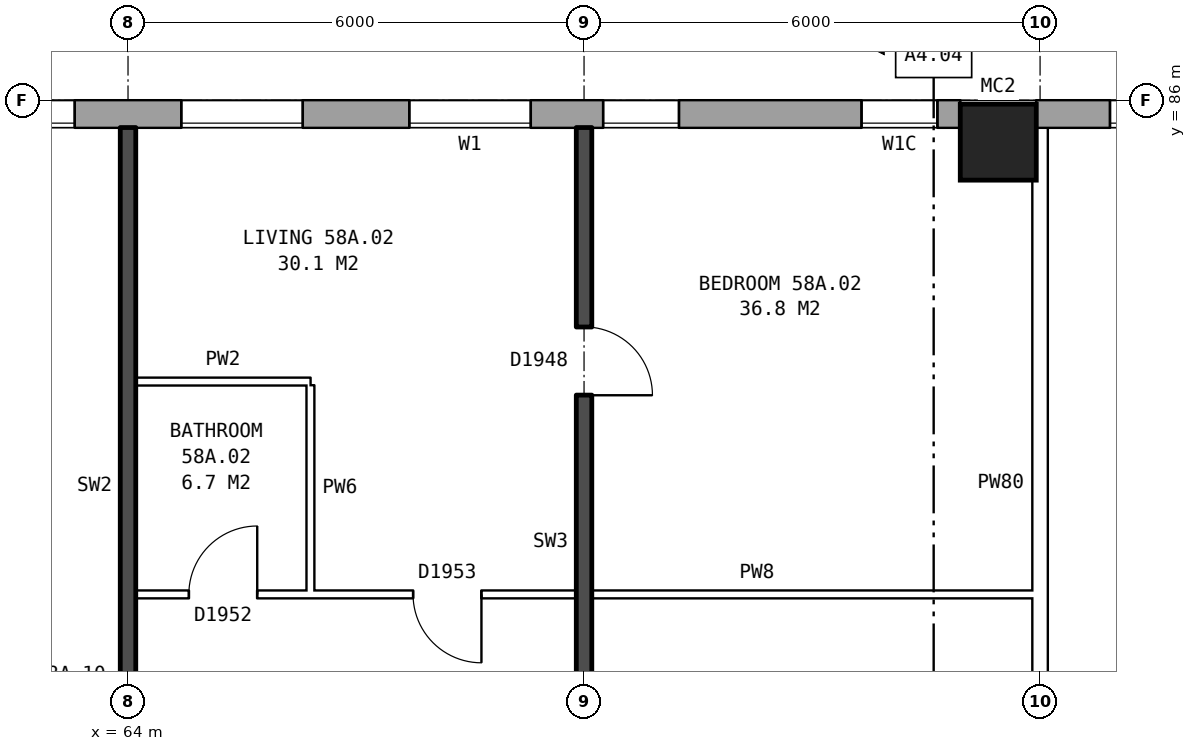
"""IFC4 building model, lengths in metres.
Left out: names, types, materials, properties, quantities, classifications, styles, units other than length and angle.
Written with IfcOpenShell. Run it as: python <this file> out.ifc"""

import sys

from ifc_helpers import new_model, si_unit, direction, frame, frame_2d, origin, origin_2d, place, context, subcontext, project, spatial, rectangle, hollow_rectangle, extrude, element, fill, save


model = new_model("IFC4")
c1 = context("Model", 3, precision=1e-05, world=origin(), true_north=direction((0.0, 1.0)))
c2 = subcontext(c1, "Body", "Model", "MODEL_VIEW")
j1 = project(units=[si_unit("LENGTHUNIT", "METRE"), si_unit("PLANEANGLEUNIT", "RADIAN")], contexts=[c1])
p1 = place(None, origin())
s1 = spatial("IfcSite", under=j1, at=p1, CompositionType="ELEMENT")
p2 = place(p1, origin())
s2 = spatial("IfcBuilding", under=s1, at=p2, CompositionType="ELEMENT")
p3 = place(p2, frame((0.0, 0.0, 205.9)))
s3 = spatial("IfcBuildingStorey", under=s2, at=p3, CompositionType="ELEMENT", Elevation=205.9)
p4 = place(p3, frame((75.45, 85.45, 0.0), z_axis=(0.0, 0.0, 1.0), x_axis=(1.0, 0.0, 0.0)))
e1 = element("IfcColumn", 1, at=p4, inside=s3, PredefinedType="COLUMN", context=c2, shape_type="SweptSolid", body=[
    extrude(hollow_rectangle(XDim=1.0, YDim=1.0, WallThickness=0.055, at=origin_2d()), origin(), (0.0, 0.0, 1.0), 3.1),
])
p5 = place(p3, frame((131.05, 85.82, 0.0), z_axis=(0.0, 0.0, 1.0), x_axis=(-1.0, 0.0, 0.0)))
e2 = element("IfcWall", 2, at=p5, inside=s3, PredefinedType="STANDARD", context=c2, shape_type="SweptSolid", body=[
    extrude(rectangle(XDim=55.1, YDim=0.36, at=frame_2d((27.55, 0.0))), origin(), (0.0, 0.0, 1.0), 2.85),
])
p6 = place(p5, frame((0.969, 0.0, 0.8)))
e3 = element("IfcOpeningElement", 3, at=p6, cuts=e2, PredefinedType="OPENING", context=c2, shape_type="SweptSolid", body=[
    extrude(rectangle(XDim=1.6, YDim=1.8, at=frame_2d((0.8, 0.9))), frame((0.0, 0.19, 0.0), z_axis=(0.0, -1.0, 0.0), x_axis=(1.0, 0.0, 0.0)), (0.0, 0.0, 1.0), 0.38),
])
p7 = place(p5, frame((4.406, 0.0, 0.8)))
e4 = element("IfcOpeningElement", 4, at=p7, cuts=e2, PredefinedType="OPENING", context=c2, shape_type="SweptSolid", body=[
    extrude(rectangle(XDim=1.6, YDim=1.8, at=frame_2d((0.8, 0.9))), frame((0.0, 0.19, 0.0), z_axis=(0.0, -1.0, 0.0), x_axis=(1.0, 0.0, 0.0)), (0.0, 0.0, 1.0), 0.38),
])
p8 = place(p5, frame((7.844, 0.0, 0.8)))
e5 = element("IfcOpeningElement", 5, at=p8, cuts=e2, PredefinedType="OPENING", context=c2, shape_type="SweptSolid", body=[
    extrude(rectangle(XDim=1.6, YDim=1.8, at=frame_2d((0.8, 0.9))), frame((0.0, 0.19, 0.0), z_axis=(0.0, -1.0, 0.0), x_axis=(1.0, 0.0, 0.0)), (0.0, 0.0, 1.0), 0.38),
])
p9 = place(p5, frame((11.281, 0.0, 0.8)))
e6 = element("IfcOpeningElement", 6, at=p9, cuts=e2, PredefinedType="OPENING", context=c2, shape_type="SweptSolid", body=[
    extrude(rectangle(XDim=1.6, YDim=1.8, at=frame_2d((0.8, 0.9))), frame((0.0, 0.19, 0.0), z_axis=(0.0, -1.0, 0.0), x_axis=(1.0, 0.0, 0.0)), (0.0, 0.0, 1.0), 0.38),
])
p10 = place(p5, frame((14.719, 0.0, 0.8)))
e7 = element("IfcOpeningElement", 7, at=p10, cuts=e2, PredefinedType="OPENING", context=c2, shape_type="SweptSolid", body=[
    extrude(rectangle(XDim=1.6, YDim=1.8, at=frame_2d((0.8, 0.9))), frame((0.0, 0.19, 0.0), z_axis=(0.0, -1.0, 0.0), x_axis=(1.0, 0.0, 0.0)), (0.0, 0.0, 1.0), 0.38),
])
p11 = place(p5, frame((18.156, 0.0, 0.8)))
e8 = element("IfcOpeningElement", 8, at=p11, cuts=e2, PredefinedType="OPENING", context=c2, shape_type="SweptSolid", body=[
    extrude(rectangle(XDim=1.6, YDim=1.8, at=frame_2d((0.8, 0.9))), frame((0.0, 0.19, 0.0), z_axis=(0.0, -1.0, 0.0), x_axis=(1.0, 0.0, 0.0)), (0.0, 0.0, 1.0), 0.38),
])
p12 = place(p5, frame((21.594, 0.0, 0.8)))
e9 = element("IfcOpeningElement", 9, at=p12, cuts=e2, PredefinedType="OPENING", context=c2, shape_type="SweptSolid", body=[
    extrude(rectangle(XDim=1.6, YDim=1.8, at=frame_2d((0.8, 0.9))), frame((0.0, 0.19, 0.0), z_axis=(0.0, -1.0, 0.0), x_axis=(1.0, 0.0, 0.0)), (0.0, 0.0, 1.0), 0.38),
])
p13 = place(p5, frame((25.031, 0.0, 0.8)))
e10 = element("IfcOpeningElement", 10, at=p13, cuts=e2, PredefinedType="OPENING", context=c2, shape_type="SweptSolid", body=[
    extrude(rectangle(XDim=1.6, YDim=1.8, at=frame_2d((0.8, 0.9))), frame((0.0, 0.19, 0.0), z_axis=(0.0, -1.0, 0.0), x_axis=(1.0, 0.0, 0.0)), (0.0, 0.0, 1.0), 0.38),
])
p14 = place(p5, frame((28.469, 0.0, 0.8)))
e11 = element("IfcOpeningElement", 11, at=p14, cuts=e2, PredefinedType="OPENING", context=c2, shape_type="SweptSolid", body=[
    extrude(rectangle(XDim=1.6, YDim=1.8, at=frame_2d((0.8, 0.9))), frame((0.0, 0.19, 0.0), z_axis=(0.0, -1.0, 0.0), x_axis=(1.0, 0.0, 0.0)), (0.0, 0.0, 1.0), 0.38),
])
p15 = place(p5, frame((31.906, 0.0, 0.8)))
e12 = element("IfcOpeningElement", 12, at=p15, cuts=e2, PredefinedType="OPENING", context=c2, shape_type="SweptSolid", body=[
    extrude(rectangle(XDim=1.6, YDim=1.8, at=frame_2d((0.8, 0.9))), frame((0.0, 0.19, 0.0), z_axis=(0.0, -1.0, 0.0), x_axis=(1.0, 0.0, 0.0)), (0.0, 0.0, 1.0), 0.38),
])
p16 = place(p5, frame((35.344, 0.0, 0.8)))
e13 = element("IfcOpeningElement", 13, at=p16, cuts=e2, PredefinedType="OPENING", context=c2, shape_type="SweptSolid", body=[
    extrude(rectangle(XDim=1.6, YDim=1.8, at=frame_2d((0.8, 0.9))), frame((0.0, 0.19, 0.0), z_axis=(0.0, -1.0, 0.0), x_axis=(1.0, 0.0, 0.0)), (0.0, 0.0, 1.0), 0.38),
])
p17 = place(p5, frame((38.781, 0.0, 0.8)))
e14 = element("IfcOpeningElement", 14, at=p17, cuts=e2, PredefinedType="OPENING", context=c2, shape_type="SweptSolid", body=[
    extrude(rectangle(XDim=1.6, YDim=1.8, at=frame_2d((0.8, 0.9))), frame((0.0, 0.19, 0.0), z_axis=(0.0, -1.0, 0.0), x_axis=(1.0, 0.0, 0.0)), (0.0, 0.0, 1.0), 0.38),
])
p18 = place(p5, frame((42.219, 0.0, 0.8)))
e15 = element("IfcOpeningElement", 15, at=p18, cuts=e2, PredefinedType="OPENING", context=c2, shape_type="SweptSolid", body=[
    extrude(rectangle(XDim=1.6, YDim=1.8, at=frame_2d((0.8, 0.9))), frame((0.0, 0.19, 0.0), z_axis=(0.0, -1.0, 0.0), x_axis=(1.0, 0.0, 0.0)), (0.0, 0.0, 1.0), 0.38),
])
p19 = place(p5, frame((45.656, 0.0, 0.8)))
e16 = element("IfcOpeningElement", 16, at=p19, cuts=e2, PredefinedType="OPENING", context=c2, shape_type="SweptSolid", body=[
    extrude(rectangle(XDim=1.6, YDim=1.8, at=frame_2d((0.8, 0.9))), frame((0.0, 0.19, 0.0), z_axis=(0.0, -1.0, 0.0), x_axis=(1.0, 0.0, 0.0)), (0.0, 0.0, 1.0), 0.38),
])
p20 = place(p5, frame((49.094, 0.0, 0.8)))
e17 = element("IfcOpeningElement", 17, at=p20, cuts=e2, PredefinedType="OPENING", context=c2, shape_type="SweptSolid", body=[
    extrude(rectangle(XDim=1.6, YDim=1.8, at=frame_2d((0.8, 0.9))), frame((0.0, 0.19, 0.0), z_axis=(0.0, -1.0, 0.0), x_axis=(1.0, 0.0, 0.0)), (0.0, 0.0, 1.0), 0.38),
])
p21 = place(p5, frame((52.531, 0.0, 0.8)))
e18 = element("IfcOpeningElement", 18, at=p21, cuts=e2, PredefinedType="OPENING", context=c2, shape_type="SweptSolid", body=[
    extrude(rectangle(XDim=1.6, YDim=1.8, at=frame_2d((0.8, 0.9))), frame((0.0, 0.19, 0.0), z_axis=(0.0, -1.0, 0.0), x_axis=(1.0, 0.0, 0.0)), (0.0, 0.0, 1.0), 0.38),
])
p22 = place(p3, frame((74.95, 85.82, 0.0), z_axis=(0.0, 0.0, 1.0), x_axis=(-1.0, 0.0, 0.0)))
e19 = element("IfcWall", 19, at=p22, inside=s3, PredefinedType="STANDARD", context=c2, shape_type="SweptSolid", body=[
    extrude(rectangle(XDim=39.875, YDim=0.36, at=frame_2d((19.938, 0.0))), origin(), (0.0, 0.0, 1.0), 2.85),
])
p23 = place(p22, frame((0.3, 0.0, 0.8)))
e20 = element("IfcOpeningElement", 20, at=p23, cuts=e19, PredefinedType="OPENING", context=c2, shape_type="SweptSolid", body=[
    extrude(rectangle(XDim=1.0, YDim=1.8, at=frame_2d((0.5, 0.9))), frame((0.0, 0.19, 0.0), z_axis=(0.0, -1.0, 0.0), x_axis=(1.0, 0.0, 0.0)), (0.0, 0.0, 1.0), 0.38),
])
p24 = place(p22, frame((5.65, 0.0, 0.8)))
e21 = element("IfcOpeningElement", 21, at=p24, cuts=e19, PredefinedType="OPENING", context=c2, shape_type="SweptSolid", body=[
    extrude(rectangle(XDim=1.6, YDim=1.8, at=frame_2d((0.8, 0.9))), frame((0.0, 0.19, 0.0), z_axis=(0.0, -1.0, 0.0), x_axis=(1.0, 0.0, 0.0)), (0.0, 0.0, 1.0), 0.38),
])
p25 = place(p22, frame((8.65, 0.0, 0.8)))
e22 = element("IfcOpeningElement", 22, at=p25, cuts=e19, PredefinedType="OPENING", context=c2, shape_type="SweptSolid", body=[
    extrude(rectangle(XDim=1.6, YDim=1.8, at=frame_2d((0.8, 0.9))), frame((0.0, 0.19, 0.0), z_axis=(0.0, -1.0, 0.0), x_axis=(1.0, 0.0, 0.0)), (0.0, 0.0, 1.0), 0.38),
])
p26 = place(p22, frame((11.65, 0.0, 0.8)))
e23 = element("IfcOpeningElement", 23, at=p26, cuts=e19, PredefinedType="OPENING", context=c2, shape_type="SweptSolid", body=[
    extrude(rectangle(XDim=1.6, YDim=1.8, at=frame_2d((0.8, 0.9))), frame((0.0, 0.19, 0.0), z_axis=(0.0, -1.0, 0.0), x_axis=(1.0, 0.0, 0.0)), (0.0, 0.0, 1.0), 0.38),
])
p27 = place(p22, frame((14.65, 0.0, 0.8)))
e24 = element("IfcOpeningElement", 24, at=p27, cuts=e19, PredefinedType="OPENING", context=c2, shape_type="SweptSolid", body=[
    extrude(rectangle(XDim=1.6, YDim=1.8, at=frame_2d((0.8, 0.9))), frame((0.0, 0.19, 0.0), z_axis=(0.0, -1.0, 0.0), x_axis=(1.0, 0.0, 0.0)), (0.0, 0.0, 1.0), 0.38),
])
p28 = place(p22, frame((17.65, 0.0, 0.8)))
e25 = element("IfcOpeningElement", 25, at=p28, cuts=e19, PredefinedType="OPENING", context=c2, shape_type="SweptSolid", body=[
    extrude(rectangle(XDim=1.6, YDim=1.8, at=frame_2d((0.8, 0.9))), frame((0.0, 0.19, 0.0), z_axis=(0.0, -1.0, 0.0), x_axis=(1.0, 0.0, 0.0)), (0.0, 0.0, 1.0), 0.38),
])
p29 = place(p22, frame((20.65, 0.0, 0.8)))
e26 = element("IfcOpeningElement", 26, at=p29, cuts=e19, PredefinedType="OPENING", context=c2, shape_type="SweptSolid", body=[
    extrude(rectangle(XDim=1.6, YDim=1.8, at=frame_2d((0.8, 0.9))), frame((0.0, 0.19, 0.0), z_axis=(0.0, -1.0, 0.0), x_axis=(1.0, 0.0, 0.0)), (0.0, 0.0, 1.0), 0.38),
])
p30 = place(p22, frame((23.65, 0.0, 0.8)))
e27 = element("IfcOpeningElement", 27, at=p30, cuts=e19, PredefinedType="OPENING", context=c2, shape_type="SweptSolid", body=[
    extrude(rectangle(XDim=1.6, YDim=1.8, at=frame_2d((0.8, 0.9))), frame((0.0, 0.19, 0.0), z_axis=(0.0, -1.0, 0.0), x_axis=(1.0, 0.0, 0.0)), (0.0, 0.0, 1.0), 0.38),
])
p31 = place(p22, frame((26.65, 0.0, 0.8)))
e28 = element("IfcOpeningElement", 28, at=p31, cuts=e19, PredefinedType="OPENING", context=c2, shape_type="SweptSolid", body=[
    extrude(rectangle(XDim=1.6, YDim=1.8, at=frame_2d((0.8, 0.9))), frame((0.0, 0.19, 0.0), z_axis=(0.0, -1.0, 0.0), x_axis=(1.0, 0.0, 0.0)), (0.0, 0.0, 1.0), 0.38),
])
p32 = place(p22, frame((29.65, 0.0, 0.8)))
e29 = element("IfcOpeningElement", 29, at=p32, cuts=e19, PredefinedType="OPENING", context=c2, shape_type="SweptSolid", body=[
    extrude(rectangle(XDim=1.6, YDim=1.8, at=frame_2d((0.8, 0.9))), frame((0.0, 0.19, 0.0), z_axis=(0.0, -1.0, 0.0), x_axis=(1.0, 0.0, 0.0)), (0.0, 0.0, 1.0), 0.38),
])
p33 = place(p22, frame((32.65, 0.0, 0.8)))
e30 = element("IfcOpeningElement", 30, at=p33, cuts=e19, PredefinedType="OPENING", context=c2, shape_type="SweptSolid", body=[
    extrude(rectangle(XDim=1.6, YDim=1.8, at=frame_2d((0.8, 0.9))), frame((0.0, 0.19, 0.0), z_axis=(0.0, -1.0, 0.0), x_axis=(1.0, 0.0, 0.0)), (0.0, 0.0, 1.0), 0.38),
])
p34 = place(p22, frame((35.65, 0.0, 0.8)))
e31 = element("IfcOpeningElement", 31, at=p34, cuts=e19, PredefinedType="OPENING", context=c2, shape_type="SweptSolid", body=[
    extrude(rectangle(XDim=1.6, YDim=1.8, at=frame_2d((0.8, 0.9))), frame((0.0, 0.19, 0.0), z_axis=(0.0, -1.0, 0.0), x_axis=(1.0, 0.0, 0.0)), (0.0, 0.0, 1.0), 0.38),
])
p35 = place(p22, frame((3.7, 0.0, 0.8)))
e32 = element("IfcOpeningElement", 32, at=p35, cuts=e19, PredefinedType="OPENING", context=c2, shape_type="SweptSolid", body=[
    extrude(rectangle(XDim=1.0, YDim=1.8, at=frame_2d((0.5, 0.9))), frame((0.0, 0.19, 0.0), z_axis=(0.0, -1.0, 0.0), x_axis=(1.0, 0.0, 0.0)), (0.0, 0.0, 1.0), 0.38),
])
p36 = place(p3, frame((64.1, 79.5, 0.0), z_axis=(0.0, 0.0, 1.0), x_axis=(1.0, 0.0, 0.0)))
e33 = element("IfcWall", 33, at=p36, inside=s3, PredefinedType="PARTITIONING", context=c2, shape_type="SweptSolid", body=[
    extrude(rectangle(XDim=11.8, YDim=0.1, at=frame_2d((5.9, 0.0))), origin(), (0.0, 0.0, 1.0), 2.85),
])
p37 = place(p36, frame((3.65, 0.0, 0.0)))
e34 = element("IfcOpeningElement", 34, at=p37, cuts=e33, PredefinedType="OPENING", context=c2, shape_type="SweptSolid", body=[
    extrude(rectangle(XDim=0.9, YDim=2.1, at=frame_2d((0.45, 1.05))), frame((0.0, 0.06, 0.0), z_axis=(0.0, -1.0, 0.0), x_axis=(1.0, 0.0, 0.0)), (0.0, 0.0, 1.0), 0.12),
])
p38 = place(p36, frame((0.7, 0.0, 0.0)))
e35 = element("IfcOpeningElement", 35, at=p38, cuts=e33, PredefinedType="OPENING", context=c2, shape_type="SweptSolid", body=[
    extrude(rectangle(XDim=0.9, YDim=2.1, at=frame_2d((0.45, 1.05))), frame((0.0, 0.06, 0.0), z_axis=(0.0, -1.0, 0.0), x_axis=(1.0, 0.0, 0.0)), (0.0, 0.0, 1.0), 0.12),
])
p39 = place(p3, frame((64.1, 82.3, 0.0), z_axis=(0.0, 0.0, 1.0), x_axis=(1.0, 0.0, 0.0)))
e36 = element("IfcWall", 36, at=p39, inside=s3, PredefinedType="PARTITIONING", context=c2, shape_type="SweptSolid", body=[
    extrude(rectangle(XDim=2.3, YDim=0.1, at=frame_2d((1.15, 0.0))), origin(), (0.0, 0.0, 1.0), 2.85),
])
p40 = place(p3, frame((64.0, 76.2, 0.0), z_axis=(0.0, 0.0, 1.0), x_axis=(0.0, 1.0, 0.0)))
e37 = element("IfcWall", 37, at=p40, inside=s3, PredefinedType="SOLIDWALL", context=c2, shape_type="SweptSolid", body=[
    extrude(rectangle(XDim=9.44, YDim=0.2, at=frame_2d((4.72, 0.0))), origin(), (0.0, 0.0, 1.0), 2.85),
])
p41 = place(p3, frame((66.4, 79.55, 0.0), z_axis=(0.0, 0.0, 1.0), x_axis=(0.0, 1.0, 0.0)))
e38 = element("IfcWall", 38, at=p41, inside=s3, PredefinedType="PARTITIONING", context=c2, shape_type="SweptSolid", body=[
    extrude(rectangle(XDim=2.7, YDim=0.1, at=frame_2d((1.35, 0.0))), origin(), (0.0, 0.0, 1.0), 2.85),
])
p42 = place(p3, frame((70.0, 76.2, 0.0), z_axis=(0.0, 0.0, 1.0), x_axis=(0.0, 1.0, 0.0)))
e39 = element("IfcWall", 39, at=p42, inside=s3, PredefinedType="SOLIDWALL", context=c2, shape_type="SweptSolid", body=[
    extrude(rectangle(XDim=9.44, YDim=0.2, at=frame_2d((4.72, 0.0))), origin(), (0.0, 0.0, 1.0), 2.85),
])
p43 = place(p42, frame((5.92, 0.0, 0.0)))
e40 = element("IfcOpeningElement", 40, at=p43, cuts=e39, PredefinedType="OPENING", context=c2, shape_type="SweptSolid", body=[
    extrude(rectangle(XDim=0.9, YDim=2.1, at=frame_2d((0.45, 1.05))), frame((0.0, 0.11, 0.0), z_axis=(0.0, -1.0, 0.0), x_axis=(1.0, 0.0, 0.0)), (0.0, 0.0, 1.0), 0.22),
])
p44 = place(p42, frame((1.25, 0.0, 0.0)))
e41 = element("IfcOpeningElement", 41, at=p44, cuts=e39, PredefinedType="OPENING", context=c2, shape_type="SweptSolid", body=[
    extrude(rectangle(XDim=0.8, YDim=2.1, at=frame_2d((0.4, 1.05))), frame((0.0, 0.11, 0.0), z_axis=(0.0, -1.0, 0.0), x_axis=(1.0, 0.0, 0.0)), (0.0, 0.0, 1.0), 0.22),
])
p45 = place(p3, frame((76.0, 76.3, 0.0), z_axis=(0.0, 0.0, 1.0), x_axis=(0.0, 1.0, 0.0)))
e42 = element("IfcWall", 42, at=p45, inside=s3, PredefinedType="PARTITIONING", context=c2, shape_type="SweptSolid", body=[
    extrude(rectangle(XDim=9.34, YDim=0.2, at=frame_2d((4.67, 0.0))), origin(), (0.0, 0.0, 1.0), 2.85),
])
p46 = place(p21, origin())
e43 = element("IfcWindow", 43, at=p46, inside=s3, PartitioningType="SINGLE_PANEL", PredefinedType="WINDOW", context=c2, shape_type="SweptSolid", body=[
    extrude(rectangle(XDim=1.6, YDim=1.8, at=frame_2d((0.8, 0.9))), frame((0.0, 0.15, 0.0), z_axis=(0.0, -1.0, 0.0), x_axis=(1.0, 0.0, 0.0)), (0.0, 0.0, 1.0), 0.06),
])
fill(e18, e43)
p47 = place(p23, origin())
e44 = element("IfcWindow", 44, at=p47, inside=s3, PartitioningType="SINGLE_PANEL", PredefinedType="WINDOW", context=c2, shape_type="SweptSolid", body=[
    extrude(rectangle(XDim=1.0, YDim=1.8, at=frame_2d((0.5, 0.9))), frame((0.0, 0.15, 0.0), z_axis=(0.0, -1.0, 0.0), x_axis=(1.0, 0.0, 0.0)), (0.0, 0.0, 1.0), 0.06),
])
fill(e20, e44)
p48 = place(p24, origin())
e45 = element("IfcWindow", 45, at=p48, inside=s3, PartitioningType="SINGLE_PANEL", PredefinedType="WINDOW", context=c2, shape_type="SweptSolid", body=[
    extrude(rectangle(XDim=1.6, YDim=1.8, at=frame_2d((0.8, 0.9))), frame((0.0, 0.15, 0.0), z_axis=(0.0, -1.0, 0.0), x_axis=(1.0, 0.0, 0.0)), (0.0, 0.0, 1.0), 0.06),
])
fill(e21, e45)
p49 = place(p25, origin())
e46 = element("IfcWindow", 46, at=p49, inside=s3, PartitioningType="SINGLE_PANEL", PredefinedType="WINDOW", context=c2, shape_type="SweptSolid", body=[
    extrude(rectangle(XDim=1.6, YDim=1.8, at=frame_2d((0.8, 0.9))), frame((0.0, 0.15, 0.0), z_axis=(0.0, -1.0, 0.0), x_axis=(1.0, 0.0, 0.0)), (0.0, 0.0, 1.0), 0.06),
])
fill(e22, e46)
p50 = place(p26, origin())
e47 = element("IfcWindow", 47, at=p50, inside=s3, PartitioningType="SINGLE_PANEL", PredefinedType="WINDOW", context=c2, shape_type="SweptSolid", body=[
    extrude(rectangle(XDim=1.6, YDim=1.8, at=frame_2d((0.8, 0.9))), frame((0.0, 0.15, 0.0), z_axis=(0.0, -1.0, 0.0), x_axis=(1.0, 0.0, 0.0)), (0.0, 0.0, 1.0), 0.06),
])
fill(e23, e47)
p51 = place(p43, frame((0.9, 0.0, 0.0), z_axis=(0.0, 0.0, 1.0), x_axis=(-1.0, 0.0, 0.0)))
e48 = element("IfcDoor", 48, at=p51, inside=s3, OperationType="SINGLE_SWING_RIGHT", PredefinedType="DOOR", context=c2, shape_type="SweptSolid", body=[
    extrude(rectangle(XDim=0.9, YDim=2.1, at=frame_2d((0.45, 1.05))), frame((0.0, 0.025, 0.0), z_axis=(0.0, -1.0, 0.0), x_axis=(1.0, 0.0, 0.0)), (0.0, 0.0, 1.0), 0.05),
])
fill(e40, e48)
p52 = place(p37, frame((0.9, 0.0, 0.0), z_axis=(0.0, 0.0, 1.0), x_axis=(-1.0, 0.0, 0.0)))
e49 = element("IfcDoor", 49, at=p52, inside=s3, OperationType="SINGLE_SWING_LEFT", PredefinedType="DOOR", context=c2, shape_type="SweptSolid", body=[
    extrude(rectangle(XDim=0.9, YDim=2.1, at=frame_2d((0.45, 1.05))), frame((0.0, 0.025, 0.0), z_axis=(0.0, -1.0, 0.0), x_axis=(1.0, 0.0, 0.0)), (0.0, 0.0, 1.0), 0.05),
])
fill(e34, e49)
p53 = place(p38, origin())
e50 = element("IfcDoor", 50, at=p53, inside=s3, OperationType="SINGLE_SWING_RIGHT", PredefinedType="DOOR", context=c2, shape_type="SweptSolid", body=[
    extrude(rectangle(XDim=0.9, YDim=2.1, at=frame_2d((0.45, 1.05))), frame((0.0, 0.025, 0.0), z_axis=(0.0, -1.0, 0.0), x_axis=(1.0, 0.0, 0.0)), (0.0, 0.0, 1.0), 0.05),
])
fill(e35, e50)
p54 = place(p35, origin())
e51 = element("IfcWindow", 51, at=p54, inside=s3, PartitioningType="SINGLE_PANEL", PredefinedType="WINDOW", context=c2, shape_type="SweptSolid", body=[
    extrude(rectangle(XDim=1.0, YDim=1.8, at=frame_2d((0.5, 0.9))), frame((0.0, 0.15, 0.0), z_axis=(0.0, -1.0, 0.0), x_axis=(1.0, 0.0, 0.0)), (0.0, 0.0, 1.0), 0.06),
])
fill(e32, e51)
save(model, sys.argv[1])
